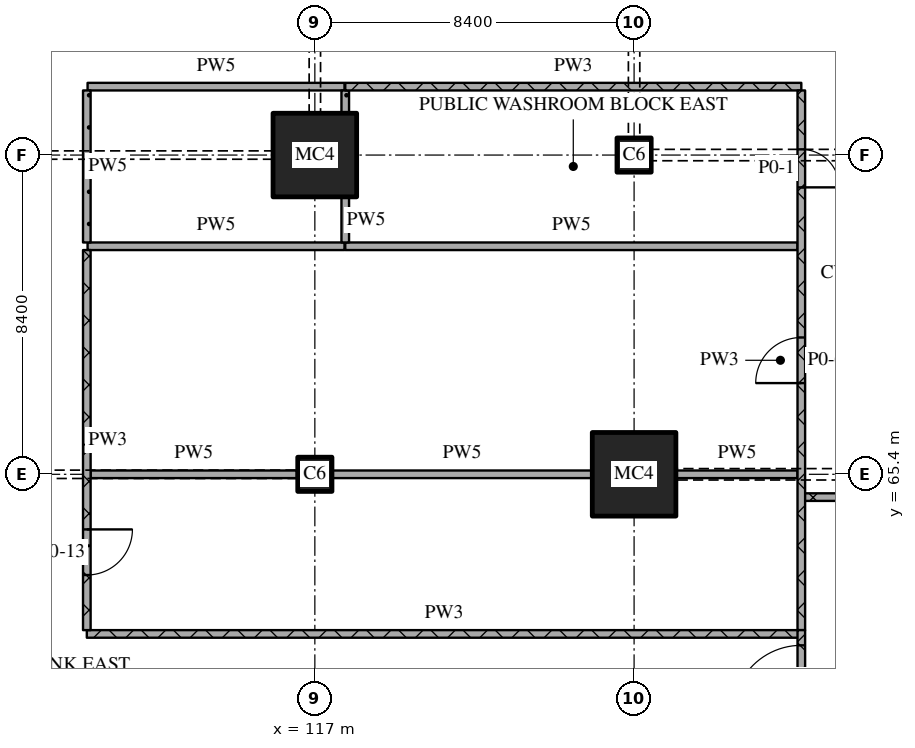
"""IFC4 building model, lengths in metres.
Left out: names, types, materials, properties, quantities, classifications, styles, units other than length and angle.
Written with IfcOpenShell. Run it as: python <this file> out.ifc"""

import sys

from ifc_helpers import new_model, si_unit, direction, frame, frame_2d, origin, origin_2d, place, context, subcontext, project, spatial, rectangle, extrude, element, fill, save


model = new_model("IFC4")
c1 = context("Model", 3, precision=1e-05, world=origin(), true_north=direction((0.0, 1.0)))
c2 = subcontext(c1, "Body", "Model", "MODEL_VIEW")
j1 = project(units=[si_unit("LENGTHUNIT", "METRE"), si_unit("PLANEANGLEUNIT", "RADIAN")], contexts=[c1])
p1 = place(None, origin())
s1 = spatial("IfcSite", under=j1, at=p1, CompositionType="ELEMENT")
p2 = place(p1, origin())
s2 = spatial("IfcBuilding", under=s1, at=p2, CompositionType="ELEMENT")
p3 = place(p2, origin())
s3 = spatial("IfcBuildingStorey", under=s2, at=p3, CompositionType="ELEMENT", Elevation=0.0)
p4 = place(p3, frame((117.0, 65.4, 0.0), z_axis=(0.0, 0.0, 1.0), x_axis=(1.0, 0.0, 0.0)))
e1 = element("IfcColumn", 1, at=p4, inside=s3, PredefinedType="COLUMN", context=c2, shape_type="SweptSolid", body=[
    extrude(rectangle(XDim=0.9, YDim=0.9, at=origin_2d()), origin(), (0.0, 0.0, 1.0), 9.0),
])
for number, where, z_axis, x_axis in (
    (2, (117.0, 73.8, 0.0), (0.0, 0.0, 1.0), (1.0, 0.0, 0.0)),
    (3, (125.4, 65.4, 0.0), (0.0, 0.0, 1.0), (1.0, 0.0, 0.0)),
):
    element("IfcColumn", number, at=place(p3, frame(where, z_axis=z_axis, x_axis=x_axis)), inside=s3, PredefinedType="COLUMN", context=c2, shape_type="SweptSolid", body=[
        extrude(rectangle(XDim=2.2, YDim=2.2, at=origin_2d()), origin(), (0.0, 0.0, 1.0), 9.0),
    ])
p5 = place(p3, frame((125.4, 73.8, 0.0), z_axis=(0.0, 0.0, 1.0), x_axis=(1.0, 0.0, 0.0)))
e4 = element("IfcColumn", 4, at=p5, inside=s3, PredefinedType="COLUMN", context=c2, shape_type="SweptSolid", body=[
    extrude(rectangle(XDim=0.9, YDim=0.9, at=origin_2d()), origin(), (0.0, 0.0, 1.0), 9.0),
])
p6 = place(p3, frame((129.8, 64.8, 0.0), z_axis=(0.0, 0.0, 1.0), x_axis=(1.0, 0.0, 0.0)))
e5 = element("IfcWall", 5, at=p6, inside=s3, PredefinedType="PARTITIONING", context=c2, shape_type="SweptSolid", body=[
    extrude(rectangle(XDim=12.27, YDim=0.2, at=frame_2d((6.135, 0.0))), origin(), (0.0, 0.0, 1.0), 8.7),
])
p7 = place(p6, frame((7.375, 0.0, 0.0)))
e6 = element("IfcOpeningElement", 6, at=p7, cuts=e5, PredefinedType="OPENING", context=c2, shape_type="SweptSolid", body=[
    extrude(rectangle(XDim=1.2, YDim=2.1, at=frame_2d((0.6, 1.05))), frame((0.0, 0.11, 0.0), z_axis=(0.0, -1.0, 0.0), x_axis=(1.0, 0.0, 0.0)), (0.0, 0.0, 1.0), 0.22),
])
p8 = place(p3, frame((111.0, 61.2, 0.0), z_axis=(0.0, 0.0, 1.0), x_axis=(1.0, 0.0, 0.0)))
e7 = element("IfcWall", 7, at=p8, inside=s3, PredefinedType="PARTITIONING", context=c2, shape_type="SweptSolid", body=[
    extrude(rectangle(XDim=18.8, YDim=0.2, at=frame_2d((9.4, 0.0))), origin(), (0.0, 0.0, 1.0), 8.7),
])
p9 = place(p3, frame((111.1, 65.4, 0.0), z_axis=(0.0, 0.0, 1.0), x_axis=(1.0, 0.0, 0.0)))
e8 = element("IfcWall", 8, at=p9, inside=s3, PredefinedType="PARTITIONING", context=c2, shape_type="SweptSolid", body=[
    extrude(rectangle(XDim=5.43, YDim=0.2, at=frame_2d((2.715, 0.0))), origin(), (0.0, 0.0, 1.0), 8.1),
])
p10 = place(p3, frame((117.47, 65.4, 0.0), z_axis=(0.0, 0.0, 1.0), x_axis=(1.0, 0.0, 0.0)))
e9 = element("IfcWall", 9, at=p10, inside=s3, PredefinedType="PARTITIONING", context=c2, shape_type="SweptSolid", body=[
    extrude(rectangle(XDim=6.81, YDim=0.2, at=frame_2d((3.405, 0.0))), origin(), (0.0, 0.0, 1.0), 8.7),
])
p11 = place(p3, frame((126.52, 65.4, 0.0), z_axis=(0.0, 0.0, 1.0), x_axis=(1.0, 0.0, 0.0)))
e10 = element("IfcWall", 10, at=p11, inside=s3, PredefinedType="PARTITIONING", context=c2, shape_type="SweptSolid", body=[
    extrude(rectangle(XDim=3.18, YDim=0.2, at=frame_2d((1.59, 0.0))), origin(), (0.0, 0.0, 1.0), 7.71),
])
p12 = place(p3, frame((111.02, 71.4, 0.0), z_axis=(0.0, 0.0, 1.0), x_axis=(1.0, 0.0, 0.0)))
e11 = element("IfcWall", 11, at=p12, inside=s3, PredefinedType="PARTITIONING", context=c2, shape_type="SweptSolid", body=[
    extrude(rectangle(XDim=6.76, YDim=0.2, at=frame_2d((3.38, 0.0))), origin(), (0.0, 0.0, 1.0), 8.7),
])
p13 = place(p3, frame((117.8, 71.4, 0.0), z_axis=(0.0, 0.0, 1.0), x_axis=(1.0, 0.0, 0.0)))
e12 = element("IfcWall", 12, at=p13, inside=s3, PredefinedType="PARTITIONING", context=c2, shape_type="SweptSolid", body=[
    extrude(rectangle(XDim=11.9, YDim=0.2, at=frame_2d((5.95, 0.0))), origin(), (0.0, 0.0, 1.0), 8.7),
])
p14 = place(p3, frame((117.8, 75.6, 0.0), z_axis=(0.0, 0.0, 1.0), x_axis=(1.0, 0.0, 0.0)))
e13 = element("IfcWall", 13, at=p14, inside=s3, PredefinedType="PARTITIONING", context=c2, shape_type="SweptSolid", body=[
    extrude(rectangle(XDim=12.0, YDim=0.2, at=frame_2d((6.0, 0.0))), origin(), (0.0, 0.0, 1.0), 8.7),
])
p15 = place(p3, frame((111.02, 75.6, 0.0), z_axis=(0.0, 0.0, 1.0), x_axis=(1.0, 0.0, 0.0)))
e14 = element("IfcWall", 14, at=p15, inside=s3, PredefinedType="PARTITIONING", context=c2, shape_type="SweptSolid", body=[
    extrude(rectangle(XDim=6.76, YDim=0.2, at=frame_2d((3.38, 0.0))), origin(), (0.0, 0.0, 1.0), 8.7),
])
p16 = place(p3, frame((111.0, 71.3, 0.0), z_axis=(0.0, 0.0, 1.0), x_axis=(0.0, -1.0, 0.0)))
e15 = element("IfcWall", 15, at=p16, inside=s3, PredefinedType="PARTITIONING", context=c2, shape_type="SweptSolid", body=[
    extrude(rectangle(XDim=10.0, YDim=0.2, at=frame_2d((5.0, 0.0))), origin(), (0.0, 0.0, 1.0), 8.7),
])
p17 = place(p16, frame((7.35, 0.0, 0.0)))
e16 = element("IfcOpeningElement", 16, at=p17, cuts=e15, PredefinedType="OPENING", context=c2, shape_type="SweptSolid", body=[
    extrude(rectangle(XDim=1.2, YDim=2.1, at=frame_2d((0.6, 1.05))), frame((0.0, 0.11, 0.0), z_axis=(0.0, -1.0, 0.0), x_axis=(1.0, 0.0, 0.0)), (0.0, 0.0, 1.0), 0.22),
])
p18 = place(p3, frame((111.0, 75.5, 0.0), z_axis=(0.0, 0.0, 1.0), x_axis=(0.0, -1.0, 0.0)))
e17 = element("IfcWall", 17, at=p18, inside=s3, PredefinedType="PARTITIONING", context=c2, shape_type="SweptSolid", body=[
    extrude(rectangle(XDim=4.0, YDim=0.2, at=frame_2d((2.0, 0.0))), origin(), (0.0, 0.0, 1.0), 8.7),
])
p19 = place(p3, frame((117.8, 72.68, 0.0), z_axis=(0.0, 0.0, 1.0), x_axis=(0.0, -1.0, 0.0)))
e18 = element("IfcWall", 18, at=p19, inside=s3, PredefinedType="PARTITIONING", context=c2, shape_type="SweptSolid", body=[
    extrude(rectangle(XDim=1.18, YDim=0.2, at=frame_2d((0.59, 0.0))), origin(), (0.0, 0.0, 1.0), 8.7),
])
p20 = place(p3, frame((117.8, 75.5, 0.0), z_axis=(0.0, 0.0, 1.0), x_axis=(0.0, -1.0, 0.0)))
e19 = element("IfcWall", 19, at=p20, inside=s3, PredefinedType="PARTITIONING", context=c2, shape_type="SweptSolid", body=[
    extrude(rectangle(XDim=0.58, YDim=0.2, at=frame_2d((0.29, 0.0))), origin(), (0.0, 0.0, 1.0), 8.7),
])
p21 = place(p3, frame((129.8, 61.3, 0.0), z_axis=(0.0, 0.0, 1.0), x_axis=(0.0, 1.0, 0.0)))
e20 = element("IfcWall", 20, at=p21, inside=s3, PredefinedType="PARTITIONING", context=c2, shape_type="SweptSolid", body=[
    extrude(rectangle(XDim=14.2, YDim=0.2, at=frame_2d((7.1, 0.0))), origin(), (0.0, 0.0, 1.0), 8.7),
])
p22 = place(p21, frame((6.5, 0.0, 0.0)))
e21 = element("IfcOpeningElement", 21, at=p22, cuts=e20, PredefinedType="OPENING", context=c2, shape_type="SweptSolid", body=[
    extrude(rectangle(XDim=1.2, YDim=2.1, at=frame_2d((0.6, 1.05))), frame((0.0, 0.11, 0.0), z_axis=(0.0, -1.0, 0.0), x_axis=(1.0, 0.0, 0.0)), (0.0, 0.0, 1.0), 0.22),
])
p23 = place(p21, frame((11.65, 0.0, 0.0)))
e22 = element("IfcOpeningElement", 22, at=p23, cuts=e20, PredefinedType="OPENING", context=c2, shape_type="SweptSolid", body=[
    extrude(rectangle(XDim=1.0, YDim=2.1, at=frame_2d((0.5, 1.05))), frame((0.0, 0.11, 0.0), z_axis=(0.0, -1.0, 0.0), x_axis=(1.0, 0.0, 0.0)), (0.0, 0.0, 1.0), 0.22),
])
p24 = place(p3, frame((129.8, 58.7, 0.0), z_axis=(0.0, 0.0, 1.0), x_axis=(0.0, 1.0, 0.0)))
e23 = element("IfcWall", 23, at=p24, inside=s3, PredefinedType="PARTITIONING", context=c2, shape_type="SweptSolid", body=[
    extrude(rectangle(XDim=2.6, YDim=0.2, at=frame_2d((1.3, 0.0))), origin(), (0.0, 0.0, 1.0), 8.7),
])
p25 = place(p24, frame((0.4, 0.0, 0.0)))
e24 = element("IfcOpeningElement", 24, at=p25, cuts=e23, PredefinedType="OPENING", context=c2, shape_type="SweptSolid", body=[
    extrude(rectangle(XDim=1.8, YDim=2.1, at=frame_2d((0.9, 1.05))), frame((0.0, 0.11, 0.0), z_axis=(0.0, -1.0, 0.0), x_axis=(1.0, 0.0, 0.0)), (0.0, 0.0, 1.0), 0.22),
])
p26 = place(p17, origin())
e25 = element("IfcDoor", 25, at=p26, inside=s3, OperationType="SINGLE_SWING_LEFT", PredefinedType="DOOR", context=c2, shape_type="SweptSolid", body=[
    extrude(rectangle(XDim=1.2, YDim=2.1, at=frame_2d((0.6, 1.05))), frame((0.0, 0.025, 0.0), z_axis=(0.0, -1.0, 0.0), x_axis=(1.0, 0.0, 0.0)), (0.0, 0.0, 1.0), 0.05),
])
fill(e16, e25)
p27 = place(p22, origin())
e26 = element("IfcDoor", 26, at=p27, inside=s3, OperationType="SINGLE_SWING_LEFT", PredefinedType="DOOR", context=c2, shape_type="SweptSolid", body=[
    extrude(rectangle(XDim=1.2, YDim=2.1, at=frame_2d((0.6, 1.05))), frame((0.0, 0.025, 0.0), z_axis=(0.0, -1.0, 0.0), x_axis=(1.0, 0.0, 0.0)), (0.0, 0.0, 1.0), 0.05),
])
fill(e21, e26)
p28 = place(p23, origin())
e27 = element("IfcDoor", 27, at=p28, inside=s3, OperationType="SINGLE_SWING_RIGHT", PredefinedType="DOOR", context=c2, shape_type="SweptSolid", body=[
    extrude(rectangle(XDim=1.0, YDim=2.1, at=frame_2d((0.5, 1.05))), frame((0.0, 0.025, 0.0), z_axis=(0.0, -1.0, 0.0), x_axis=(1.0, 0.0, 0.0)), (0.0, 0.0, 1.0), 0.05),
])
fill(e22, e27)
p29 = place(p25, origin())
e28 = element("IfcDoor", 28, at=p29, inside=s3, OperationType="DOUBLE_DOOR_SINGLE_SWING", PredefinedType="DOOR", context=c2, shape_type="SweptSolid", body=[
    extrude(rectangle(XDim=1.8, YDim=2.1, at=frame_2d((0.9, 1.05))), frame((0.0, 0.025, 0.0), z_axis=(0.0, -1.0, 0.0), x_axis=(1.0, 0.0, 0.0)), (0.0, 0.0, 1.0), 0.05),
])
fill(e24, e28)
save(model, sys.argv[1])
